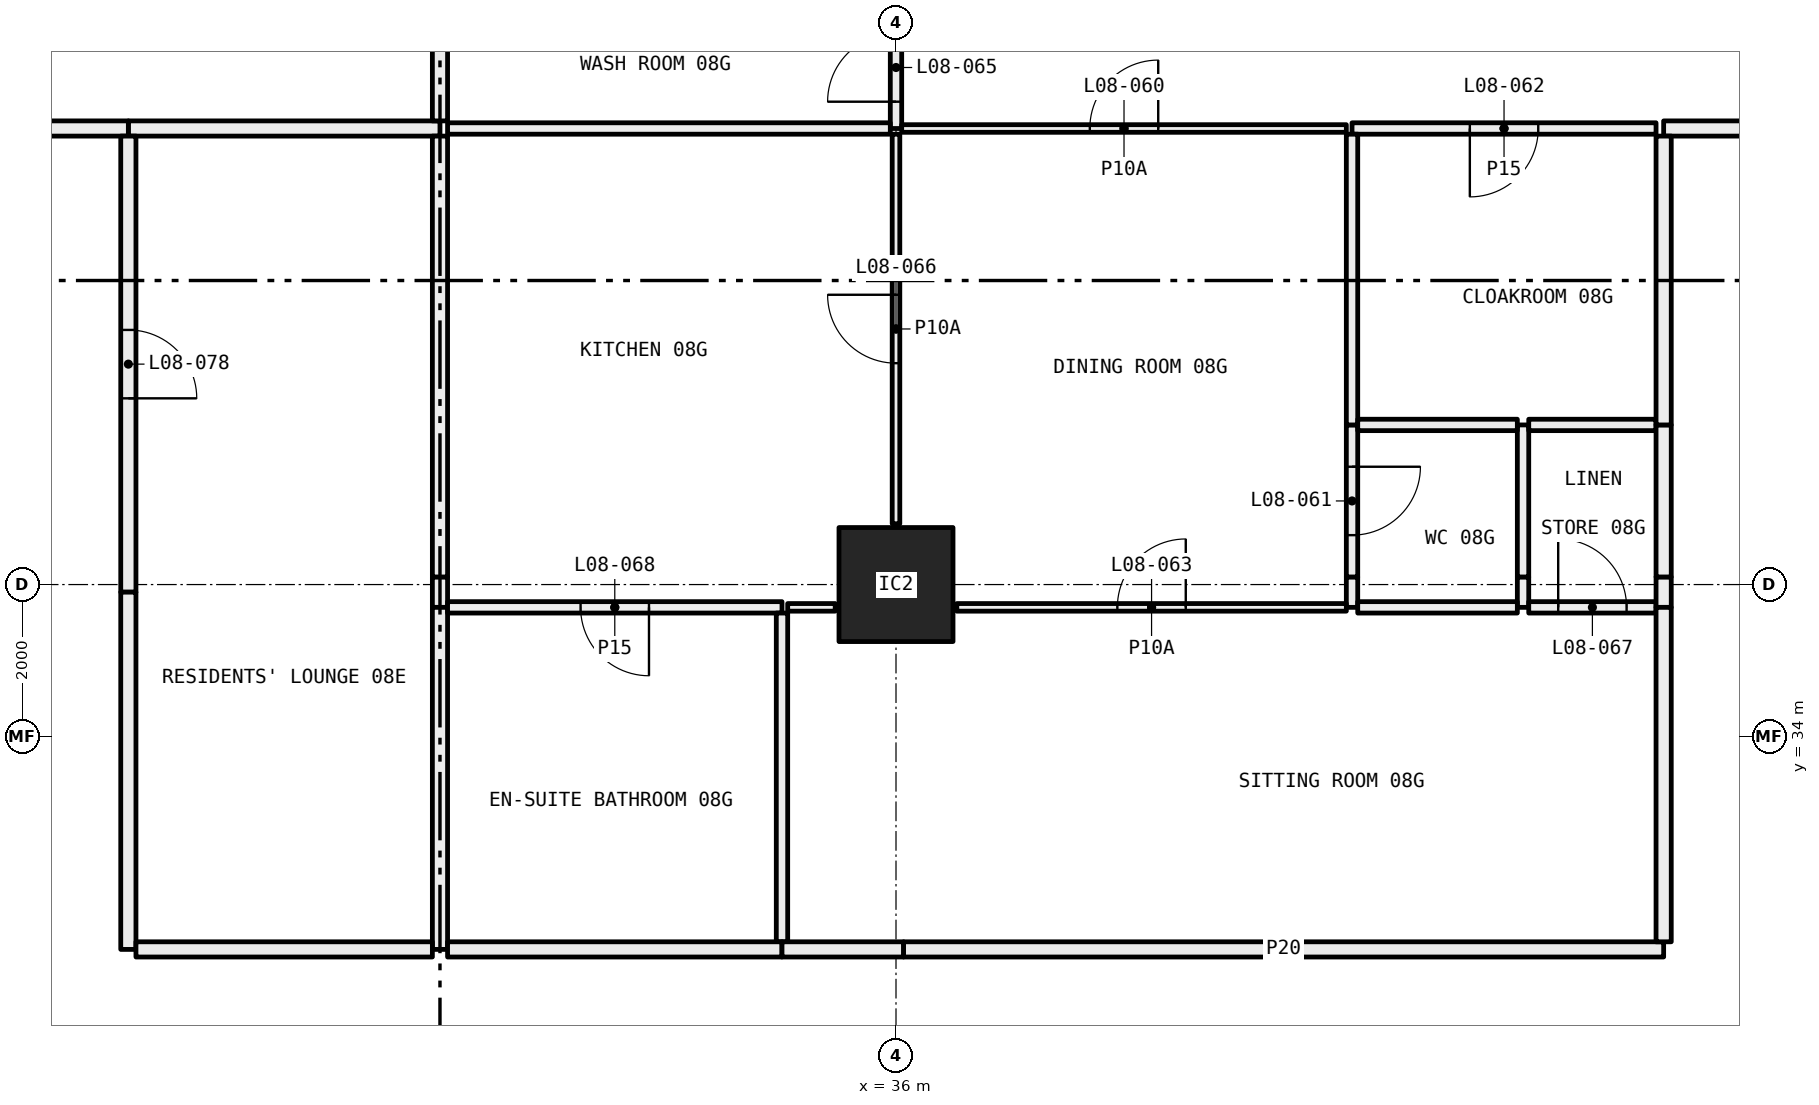
"""IFC4 building model, lengths in metres.
Left out: names, types, materials, properties, quantities, classifications, styles, units other than length and angle.
Written with IfcOpenShell. Run it as: python <this file> out.ifc"""

import sys

from ifc_helpers import new_model, si_unit, direction, frame, frame_2d, origin, origin_2d, place, context, subcontext, project, spatial, rectangle, hollow_rectangle, extrude, element, fill, save


model = new_model("IFC4")
c1 = context("Model", 3, precision=1e-05, world=origin(), true_north=direction((0.0, 1.0)))
c2 = subcontext(c1, "Body", "Model", "MODEL_VIEW")
j1 = project(units=[si_unit("LENGTHUNIT", "METRE"), si_unit("PLANEANGLEUNIT", "RADIAN")], contexts=[c1])
p1 = place(None, origin())
s1 = spatial("IfcSite", under=j1, at=p1, CompositionType="ELEMENT")
p2 = place(p1, origin())
s2 = spatial("IfcBuilding", under=s1, at=p2, CompositionType="ELEMENT")
p3 = place(p2, frame((0.0, 0.0, 40.35)))
s3 = spatial("IfcBuildingStorey", under=s2, at=p3, CompositionType="ELEMENT", Elevation=40.35)
p4 = place(p3, frame((36.0, 36.0, 0.0), z_axis=(0.0, 0.0, 1.0), x_axis=(1.0, 0.0, 0.0)))
e1 = element("IfcColumn", 1, at=p4, inside=s3, PredefinedType="COLUMN", context=c2, shape_type="SweptSolid", body=[
    extrude(hollow_rectangle(XDim=1.5, YDim=1.5, WallThickness=0.065, at=origin_2d()), origin(), (0.0, 0.0, 1.0), 3.05),
])
p5 = place(p3, frame((25.9, 42.0, 0.0), z_axis=(0.0, 0.0, 1.0), x_axis=(1.0, 0.0, 0.0)))
e2 = element("IfcWall", 2, at=p5, inside=s3, PredefinedType="PARTITIONING", context=c2, shape_type="SweptSolid", body=[
    extrude(rectangle(XDim=4.1, YDim=0.2, at=frame_2d((2.05, 0.0))), origin(), (0.0, 0.0, 1.0), 3.05),
])
p6 = place(p3, frame((30.0, 42.1, 0.0), z_axis=(0.0, 0.0, 1.0), x_axis=(0.0, 1.0, 0.0)))
e3 = element("IfcWall", 3, at=p6, inside=s3, PredefinedType="PARTITIONING", context=c2, shape_type="SweptSolid", body=[
    extrude(rectangle(XDim=1.58, YDim=0.2, at=frame_2d((0.79, 0.0))), origin(), (0.0, 0.0, 1.0), 3.05),
])
p7 = place(p3, frame((24.0, 42.0, 0.0), z_axis=(0.0, 0.0, 1.0), x_axis=(1.0, 0.0, 0.0)))
e4 = element("IfcWall", 4, at=p7, inside=s3, PredefinedType="PARTITIONING", context=c2, shape_type="SweptSolid", body=[
    extrude(rectangle(XDim=1.9, YDim=0.2, at=frame_2d((0.95, 0.0))), origin(), (0.0, 0.0, 1.0), 3.05),
])
p8 = place(p3, frame((30.0, 35.7, 0.0), z_axis=(0.0, 0.0, 1.0), x_axis=(0.0, 1.0, 0.0)))
e5 = element("IfcWall", 5, at=p8, inside=s3, PredefinedType="PARTITIONING", context=c2, shape_type="SweptSolid", body=[
    extrude(rectangle(XDim=0.4, YDim=0.2, at=frame_2d((0.2, 0.0))), origin(), (0.0, 0.0, 1.0), 2.45),
])
p9 = place(p3, frame((30.0, 36.1, 0.0), z_axis=(0.0, 0.0, 1.0), x_axis=(0.0, 1.0, 0.0)))
e6 = element("IfcWall", 6, at=p9, inside=s3, PredefinedType="PARTITIONING", context=c2, shape_type="SweptSolid", body=[
    extrude(rectangle(XDim=5.8, YDim=0.2, at=frame_2d((2.9, 0.0))), origin(), (0.0, 0.0, 1.0), 3.05),
])
p10 = place(p3, frame((30.0, 31.2, 0.0), z_axis=(0.0, 0.0, 1.0), x_axis=(0.0, 1.0, 0.0)))
e7 = element("IfcWall", 7, at=p10, inside=s3, PredefinedType="PARTITIONING", context=c2, shape_type="SweptSolid", body=[
    extrude(rectangle(XDim=4.5, YDim=0.2, at=frame_2d((2.25, 0.0))), origin(), (0.0, 0.0, 1.0), 3.05),
])
p11 = place(p3, frame((25.9, 41.9, 0.0), z_axis=(0.0, 0.0, 1.0), x_axis=(0.0, -1.0, 0.0)))
e8 = element("IfcWall", 8, at=p11, inside=s3, PredefinedType="PARTITIONING", context=c2, shape_type="SweptSolid", body=[
    extrude(rectangle(XDim=6.0, YDim=0.2, at=frame_2d((3.0, 0.0))), origin(), (0.0, 0.0, 1.0), 2.45),
])
p12 = place(p11, frame((2.55, 0.0, 0.0)))
e9 = element("IfcOpeningElement", 9, at=p12, cuts=e8, PredefinedType="OPENING", context=c2, shape_type="SweptSolid", body=[
    extrude(rectangle(XDim=0.9, YDim=2.1, at=frame_2d((0.45, 1.05))), frame((0.0, 0.11, 0.0), z_axis=(0.0, -1.0, 0.0), x_axis=(1.0, 0.0, 0.0)), (0.0, 0.0, 1.0), 0.22),
])
p13 = place(p3, frame((25.9, 35.9, 0.0), z_axis=(0.0, 0.0, 1.0), x_axis=(0.0, -1.0, 0.0)))
e10 = element("IfcWall", 10, at=p13, inside=s3, PredefinedType="PARTITIONING", context=c2, shape_type="SweptSolid", body=[
    extrude(rectangle(XDim=4.7, YDim=0.2, at=frame_2d((2.35, 0.0))), origin(), (0.0, 0.0, 1.0), 3.05),
])
p14 = place(p3, frame((26.0, 31.2, 0.0), z_axis=(0.0, 0.0, 1.0), x_axis=(1.0, 0.0, 0.0)))
e11 = element("IfcWall", 11, at=p14, inside=s3, PredefinedType="PARTITIONING", context=c2, shape_type="SweptSolid", body=[
    extrude(rectangle(XDim=3.9, YDim=0.2, at=frame_2d((1.95, 0.0))), origin(), (0.0, 0.0, 1.0), 3.05),
])
p15 = place(p3, frame((36.0, 42.0, 0.0), z_axis=(0.0, 0.0, 1.0), x_axis=(0.0, 1.0, 0.0)))
e12 = element("IfcWall", 12, at=p15, inside=s3, PredefinedType="PARTITIONING", context=c2, shape_type="SweptSolid", body=[
    extrude(rectangle(XDim=1.605, YDim=0.15, at=frame_2d((0.802, 0.0))), origin(), (0.0, 0.0, 1.0), 2.45),
])
p16 = place(p15, frame((0.353, 0.0, 0.0)))
e13 = element("IfcOpeningElement", 13, at=p16, cuts=e12, PredefinedType="OPENING", context=c2, shape_type="SweptSolid", body=[
    extrude(rectangle(XDim=0.9, YDim=2.1, at=frame_2d((0.45, 1.05))), frame((0.0, 0.085, 0.0), z_axis=(0.0, -1.0, 0.0), x_axis=(1.0, 0.0, 0.0)), (0.0, 0.0, 1.0), 0.17),
])
p17 = place(p3, frame((30.1, 42.0, 0.0), z_axis=(0.0, 0.0, 1.0), x_axis=(1.0, 0.0, 0.0)))
e14 = element("IfcWall", 14, at=p17, inside=s3, PredefinedType="PARTITIONING", context=c2, shape_type="SweptSolid", body=[
    extrude(rectangle(XDim=5.825, YDim=0.15, at=frame_2d((2.913, 0.0))), origin(), (0.0, 0.0, 1.0), 2.45),
])
p18 = place(p3, frame((36.075, 42.0, 0.0), z_axis=(0.0, 0.0, 1.0), x_axis=(1.0, 0.0, 0.0)))
e15 = element("IfcWall", 15, at=p18, inside=s3, PredefinedType="PARTITIONING", context=c2, shape_type="SweptSolid", body=[
    extrude(rectangle(XDim=5.85, YDim=0.1, at=frame_2d((2.925, 0.0))), origin(), (0.0, 0.0, 1.0), 2.45),
])
p19 = place(p18, frame((2.475, 0.0, 0.0)))
e16 = element("IfcOpeningElement", 16, at=p19, cuts=e15, PredefinedType="OPENING", context=c2, shape_type="SweptSolid", body=[
    extrude(rectangle(XDim=0.9, YDim=2.1, at=frame_2d((0.45, 1.05))), frame((0.0, 0.06, 0.0), z_axis=(0.0, -1.0, 0.0), x_axis=(1.0, 0.0, 0.0)), (0.0, 0.0, 1.0), 0.12),
])
p20 = place(p3, frame((42.0, 42.0, 0.0), z_axis=(0.0, 0.0, 1.0), x_axis=(1.0, 0.0, 0.0)))
e17 = element("IfcWall", 17, at=p20, inside=s3, PredefinedType="PARTITIONING", context=c2, shape_type="SweptSolid", body=[
    extrude(rectangle(XDim=4.0, YDim=0.15, at=frame_2d((2.0, 0.0))), origin(), (0.0, 0.0, 1.0), 3.05),
])
p21 = place(p20, frame((1.55, 0.0, 0.0)))
e18 = element("IfcOpeningElement", 18, at=p21, cuts=e17, PredefinedType="OPENING", context=c2, shape_type="SweptSolid", body=[
    extrude(rectangle(XDim=0.9, YDim=2.1, at=frame_2d((0.45, 1.05))), frame((0.0, 0.085, 0.0), z_axis=(0.0, -1.0, 0.0), x_axis=(1.0, 0.0, 0.0)), (0.0, 0.0, 1.0), 0.17),
])
p22 = place(p3, frame((46.1, 42.0, 0.0), z_axis=(0.0, 0.0, 1.0), x_axis=(1.0, 0.0, 0.0)))
e19 = element("IfcWall", 19, at=p22, inside=s3, PredefinedType="PARTITIONING", context=c2, shape_type="SweptSolid", body=[
    extrude(rectangle(XDim=1.9, YDim=0.2, at=frame_2d((0.95, 0.0))), origin(), (0.0, 0.0, 1.0), 3.05),
])
p23 = place(p3, frame((36.0, 36.8, 0.0), z_axis=(0.0, 0.0, 1.0), x_axis=(0.0, 1.0, 0.0)))
e20 = element("IfcWall", 20, at=p23, inside=s3, PredefinedType="PARTITIONING", context=c2, shape_type="SweptSolid", body=[
    extrude(rectangle(XDim=5.125, YDim=0.1, at=frame_2d((2.562, 0.0))), origin(), (0.0, 0.0, 1.0), 2.45),
])
p24 = place(p23, frame((2.113, 0.0, 0.0)))
e21 = element("IfcOpeningElement", 21, at=p24, cuts=e20, PredefinedType="OPENING", context=c2, shape_type="SweptSolid", body=[
    extrude(rectangle(XDim=0.9, YDim=2.1, at=frame_2d((0.45, 1.05))), frame((0.0, 0.06, 0.0), z_axis=(0.0, -1.0, 0.0), x_axis=(1.0, 0.0, 0.0)), (0.0, 0.0, 1.0), 0.12),
])
p25 = place(p3, frame((30.1, 35.7, 0.0), z_axis=(0.0, 0.0, 1.0), x_axis=(1.0, 0.0, 0.0)))
e22 = element("IfcWall", 22, at=p25, inside=s3, PredefinedType="PARTITIONING", context=c2, shape_type="SweptSolid", body=[
    extrude(rectangle(XDim=4.4, YDim=0.15, at=frame_2d((2.2, 0.0))), origin(), (0.0, 0.0, 1.0), 3.05),
])
p26 = place(p25, frame((1.75, 0.0, 0.0)))
e23 = element("IfcOpeningElement", 23, at=p26, cuts=e22, PredefinedType="OPENING", context=c2, shape_type="SweptSolid", body=[
    extrude(rectangle(XDim=0.9, YDim=2.1, at=frame_2d((0.45, 1.05))), frame((0.0, 0.085, 0.0), z_axis=(0.0, -1.0, 0.0), x_axis=(1.0, 0.0, 0.0)), (0.0, 0.0, 1.0), 0.17),
])
p27 = place(p3, frame((34.575, 35.7, 0.0), z_axis=(0.0, 0.0, 1.0), x_axis=(1.0, 0.0, 0.0)))
e24 = element("IfcWall", 24, at=p27, inside=s3, PredefinedType="PARTITIONING", context=c2, shape_type="SweptSolid", body=[
    extrude(rectangle(XDim=0.625, YDim=0.1, at=frame_2d((0.312, 0.0))), origin(), (0.0, 0.0, 1.0), 3.05),
])
p28 = place(p3, frame((42.0, 35.7, 0.0), z_axis=(0.0, 0.0, 1.0), x_axis=(0.0, 1.0, 0.0)))
e25 = element("IfcWall", 25, at=p28, inside=s3, PredefinedType="PARTITIONING", context=c2, shape_type="SweptSolid", body=[
    extrude(rectangle(XDim=0.4, YDim=0.15, at=frame_2d((0.2, 0.0))), origin(), (0.0, 0.0, 1.0), 2.45),
])
p29 = place(p3, frame((42.0, 36.1, 0.0), z_axis=(0.0, 0.0, 1.0), x_axis=(0.0, 1.0, 0.0)))
e26 = element("IfcWall", 26, at=p29, inside=s3, PredefinedType="PARTITIONING", context=c2, shape_type="SweptSolid", body=[
    extrude(rectangle(XDim=2.0, YDim=0.15, at=frame_2d((1.0, 0.0))), origin(), (0.0, 0.0, 1.0), 3.05),
])
p30 = place(p29, frame((0.55, 0.0, 0.0)))
e27 = element("IfcOpeningElement", 27, at=p30, cuts=e26, PredefinedType="OPENING", context=c2, shape_type="SweptSolid", body=[
    extrude(rectangle(XDim=0.9, YDim=2.1, at=frame_2d((0.45, 1.05))), frame((0.0, 0.085, 0.0), z_axis=(0.0, -1.0, 0.0), x_axis=(1.0, 0.0, 0.0)), (0.0, 0.0, 1.0), 0.17),
])
p31 = place(p3, frame((42.0, 38.1, 0.0), z_axis=(0.0, 0.0, 1.0), x_axis=(0.0, 1.0, 0.0)))
e28 = element("IfcWall", 28, at=p31, inside=s3, PredefinedType="PARTITIONING", context=c2, shape_type="SweptSolid", body=[
    extrude(rectangle(XDim=3.825, YDim=0.15, at=frame_2d((1.913, 0.0))), origin(), (0.0, 0.0, 1.0), 3.05),
])
p32 = place(p3, frame((36.8, 35.7, 0.0), z_axis=(0.0, 0.0, 1.0), x_axis=(1.0, 0.0, 0.0)))
e29 = element("IfcWall", 29, at=p32, inside=s3, PredefinedType="PARTITIONING", context=c2, shape_type="SweptSolid", body=[
    extrude(rectangle(XDim=5.125, YDim=0.1, at=frame_2d((2.562, 0.0))), origin(), (0.0, 0.0, 1.0), 3.05),
])
p33 = place(p32, frame((2.113, 0.0, 0.0)))
e30 = element("IfcOpeningElement", 30, at=p33, cuts=e29, PredefinedType="OPENING", context=c2, shape_type="SweptSolid", body=[
    extrude(rectangle(XDim=0.9, YDim=2.1, at=frame_2d((0.45, 1.05))), frame((0.0, 0.06, 0.0), z_axis=(0.0, -1.0, 0.0), x_axis=(1.0, 0.0, 0.0)), (0.0, 0.0, 1.0), 0.12),
])
p34 = place(p3, frame((44.25, 35.7, 0.0), z_axis=(0.0, 0.0, 1.0), x_axis=(0.0, 1.0, 0.0)))
e31 = element("IfcWall", 31, at=p34, inside=s3, PredefinedType="PARTITIONING", context=c2, shape_type="SweptSolid", body=[
    extrude(rectangle(XDim=0.4, YDim=0.15, at=frame_2d((0.2, 0.0))), origin(), (0.0, 0.0, 1.0), 2.45),
])
p35 = place(p3, frame((44.25, 36.1, 0.0), z_axis=(0.0, 0.0, 1.0), x_axis=(0.0, 1.0, 0.0)))
e32 = element("IfcWall", 32, at=p35, inside=s3, PredefinedType="PARTITIONING", context=c2, shape_type="SweptSolid", body=[
    extrude(rectangle(XDim=2.0, YDim=0.15, at=frame_2d((1.0, 0.0))), origin(), (0.0, 0.0, 1.0), 3.05),
])
for number, where, z_axis, x_axis in (
    (33, (44.175, 38.1, 0.0), (0.0, 0.0, 1.0), (-1.0, 0.0, 0.0)),
    (34, (42.075, 35.7, 0.0), (0.0, 0.0, 1.0), (1.0, 0.0, 0.0)),
):
    element("IfcWall", number, at=place(p3, frame(where, z_axis=z_axis, x_axis=x_axis)), inside=s3, PredefinedType="PARTITIONING", context=c2, shape_type="SweptSolid", body=[
        extrude(rectangle(XDim=2.1, YDim=0.15, at=frame_2d((1.05, 0.0))), origin(), (0.0, 0.0, 1.0), 3.05),
    ])
p36 = place(p3, frame((46.0, 38.1, 0.0), z_axis=(0.0, 0.0, 1.0), x_axis=(-1.0, 0.0, 0.0)))
e35 = element("IfcWall", 35, at=p36, inside=s3, PredefinedType="PARTITIONING", context=c2, shape_type="SweptSolid", body=[
    extrude(rectangle(XDim=1.675, YDim=0.15, at=frame_2d((0.837, 0.0))), origin(), (0.0, 0.0, 1.0), 3.05),
])
p37 = place(p3, frame((44.325, 35.7, 0.0), z_axis=(0.0, 0.0, 1.0), x_axis=(1.0, 0.0, 0.0)))
e36 = element("IfcWall", 36, at=p37, inside=s3, PredefinedType="PARTITIONING", context=c2, shape_type="SweptSolid", body=[
    extrude(rectangle(XDim=1.675, YDim=0.15, at=frame_2d((0.837, 0.0))), origin(), (0.0, 0.0, 1.0), 3.05),
])
p38 = place(p37, frame((0.387, 0.0, 0.0)))
e37 = element("IfcOpeningElement", 37, at=p38, cuts=e36, PredefinedType="OPENING", context=c2, shape_type="SweptSolid", body=[
    extrude(rectangle(XDim=0.9, YDim=2.1, at=frame_2d((0.45, 1.05))), frame((0.0, 0.085, 0.0), z_axis=(0.0, -1.0, 0.0), x_axis=(1.0, 0.0, 0.0)), (0.0, 0.0, 1.0), 0.17),
])
p39 = place(p3, frame((46.1, 35.7, 0.0), z_axis=(0.0, 0.0, 1.0), x_axis=(0.0, 1.0, 0.0)))
e38 = element("IfcWall", 38, at=p39, inside=s3, PredefinedType="PARTITIONING", context=c2, shape_type="SweptSolid", body=[
    extrude(rectangle(XDim=0.4, YDim=0.2, at=frame_2d((0.2, 0.0))), origin(), (0.0, 0.0, 1.0), 2.45),
])
p40 = place(p3, frame((46.1, 36.1, 0.0), z_axis=(0.0, 0.0, 1.0), x_axis=(0.0, 1.0, 0.0)))
e39 = element("IfcWall", 39, at=p40, inside=s3, PredefinedType="PARTITIONING", context=c2, shape_type="SweptSolid", body=[
    extrude(rectangle(XDim=2.0, YDim=0.2, at=frame_2d((1.0, 0.0))), origin(), (0.0, 0.0, 1.0), 3.05),
])
p41 = place(p3, frame((46.1, 38.1, 0.0), z_axis=(0.0, 0.0, 1.0), x_axis=(0.0, 1.0, 0.0)))
e40 = element("IfcWall", 40, at=p41, inside=s3, PredefinedType="PARTITIONING", context=c2, shape_type="SweptSolid", body=[
    extrude(rectangle(XDim=3.8, YDim=0.2, at=frame_2d((1.9, 0.0))), origin(), (0.0, 0.0, 1.0), 3.05),
])
p42 = place(p3, frame((34.5, 31.3, 0.0), z_axis=(0.0, 0.0, 1.0), x_axis=(0.0, 1.0, 0.0)))
e41 = element("IfcWall", 41, at=p42, inside=s3, PredefinedType="PARTITIONING", context=c2, shape_type="SweptSolid", body=[
    extrude(rectangle(XDim=4.325, YDim=0.15, at=frame_2d((2.163, 0.0))), origin(), (0.0, 0.0, 1.0), 3.05),
])
p43 = place(p3, frame((30.1, 31.2, 0.0), z_axis=(0.0, 0.0, 1.0), x_axis=(1.0, 0.0, 0.0)))
e42 = element("IfcWall", 42, at=p43, inside=s3, PredefinedType="PARTITIONING", context=c2, shape_type="SweptSolid", body=[
    extrude(rectangle(XDim=4.4, YDim=0.2, at=frame_2d((2.2, 0.0))), origin(), (0.0, 0.0, 1.0), 3.05),
])
p44 = place(p3, frame((34.5, 31.2, 0.0), z_axis=(0.0, 0.0, 1.0), x_axis=(1.0, 0.0, 0.0)))
e43 = element("IfcWall", 43, at=p44, inside=s3, PredefinedType="PARTITIONING", context=c2, shape_type="SweptSolid", body=[
    extrude(rectangle(XDim=1.6, YDim=0.2, at=frame_2d((0.8, 0.0))), origin(), (0.0, 0.0, 1.0), 2.45),
])
p45 = place(p3, frame((36.1, 31.2, 0.0), z_axis=(0.0, 0.0, 1.0), x_axis=(1.0, 0.0, 0.0)))
e44 = element("IfcWall", 44, at=p45, inside=s3, PredefinedType="PARTITIONING", context=c2, shape_type="SweptSolid", body=[
    extrude(rectangle(XDim=10.0, YDim=0.2, at=frame_2d((5.0, 0.0))), origin(), (0.0, 0.0, 1.0), 3.05),
])
p46 = place(p3, frame((46.1, 31.3, 0.0), z_axis=(0.0, 0.0, 1.0), x_axis=(0.0, 1.0, 0.0)))
e45 = element("IfcWall", 45, at=p46, inside=s3, PredefinedType="PARTITIONING", context=c2, shape_type="SweptSolid", body=[
    extrude(rectangle(XDim=4.4, YDim=0.2, at=frame_2d((2.2, 0.0))), origin(), (0.0, 0.0, 1.0), 3.05),
])
p47 = place(p19, origin())
e46 = element("IfcDoor", 46, at=p47, inside=s3, OperationType="SINGLE_SWING_LEFT", PredefinedType="DOOR", context=c2, shape_type="SweptSolid", body=[
    extrude(rectangle(XDim=0.9, YDim=2.1, at=frame_2d((0.45, 1.05))), frame((0.0, 0.025, 0.0), z_axis=(0.0, -1.0, 0.0), x_axis=(1.0, 0.0, 0.0)), (0.0, 0.0, 1.0), 0.05),
])
fill(e16, e46)
p48 = place(p30, frame((0.9, 0.0, 0.0), x_axis=(-1.0, 0.0, 0.0)))
e47 = element("IfcDoor", 47, at=p48, inside=s3, OperationType="SINGLE_SWING_RIGHT", PredefinedType="DOOR", context=c2, shape_type="SweptSolid", body=[
    extrude(rectangle(XDim=0.9, YDim=2.1, at=frame_2d((0.45, 1.05))), frame((0.0, 0.025, 0.0), z_axis=(0.0, -1.0, 0.0), x_axis=(1.0, 0.0, 0.0)), (0.0, 0.0, 1.0), 0.05),
])
fill(e27, e47)
p49 = place(p21, frame((0.9, 0.0, 0.0), x_axis=(-1.0, 0.0, 0.0)))
e48 = element("IfcDoor", 48, at=p49, inside=s3, OperationType="SINGLE_SWING_LEFT", PredefinedType="DOOR", context=c2, shape_type="SweptSolid", body=[
    extrude(rectangle(XDim=0.9, YDim=2.1, at=frame_2d((0.45, 1.05))), frame((0.0, 0.025, 0.0), z_axis=(0.0, -1.0, 0.0), x_axis=(1.0, 0.0, 0.0)), (0.0, 0.0, 1.0), 0.05),
])
fill(e18, e48)
p50 = place(p33, origin())
e49 = element("IfcDoor", 49, at=p50, inside=s3, OperationType="SINGLE_SWING_LEFT", PredefinedType="DOOR", context=c2, shape_type="SweptSolid", body=[
    extrude(rectangle(XDim=0.9, YDim=2.1, at=frame_2d((0.45, 1.05))), frame((0.0, 0.025, 0.0), z_axis=(0.0, -1.0, 0.0), x_axis=(1.0, 0.0, 0.0)), (0.0, 0.0, 1.0), 0.05),
])
fill(e30, e49)
p51 = place(p16, origin())
e50 = element("IfcDoor", 50, at=p51, inside=s3, OperationType="SINGLE_SWING_RIGHT", PredefinedType="DOOR", context=c2, shape_type="SweptSolid", body=[
    extrude(rectangle(XDim=0.9, YDim=2.1, at=frame_2d((0.45, 1.05))), frame((0.0, 0.025, 0.0), z_axis=(0.0, -1.0, 0.0), x_axis=(1.0, 0.0, 0.0)), (0.0, 0.0, 1.0), 0.05),
])
fill(e13, e50)
p52 = place(p24, origin())
e51 = element("IfcDoor", 51, at=p52, inside=s3, OperationType="SINGLE_SWING_LEFT", PredefinedType="DOOR", context=c2, shape_type="SweptSolid", body=[
    extrude(rectangle(XDim=0.9, YDim=2.1, at=frame_2d((0.45, 1.05))), frame((0.0, 0.025, 0.0), z_axis=(0.0, -1.0, 0.0), x_axis=(1.0, 0.0, 0.0)), (0.0, 0.0, 1.0), 0.05),
])
fill(e21, e51)
p53 = place(p38, origin())
e52 = element("IfcDoor", 52, at=p53, inside=s3, OperationType="SINGLE_SWING_RIGHT", PredefinedType="DOOR", context=c2, shape_type="SweptSolid", body=[
    extrude(rectangle(XDim=0.9, YDim=2.1, at=frame_2d((0.45, 1.05))), frame((0.0, 0.025, 0.0), z_axis=(0.0, -1.0, 0.0), x_axis=(1.0, 0.0, 0.0)), (0.0, 0.0, 1.0), 0.05),
])
fill(e37, e52)
p54 = place(p26, frame((0.9, 0.0, 0.0), x_axis=(-1.0, 0.0, 0.0)))
e53 = element("IfcDoor", 53, at=p54, inside=s3, OperationType="SINGLE_SWING_RIGHT", PredefinedType="DOOR", context=c2, shape_type="SweptSolid", body=[
    extrude(rectangle(XDim=0.9, YDim=2.1, at=frame_2d((0.45, 1.05))), frame((0.0, 0.025, 0.0), z_axis=(0.0, -1.0, 0.0), x_axis=(1.0, 0.0, 0.0)), (0.0, 0.0, 1.0), 0.05),
])
fill(e23, e53)
p55 = place(p12, origin())
e54 = element("IfcDoor", 54, at=p55, inside=s3, OperationType="SINGLE_SWING_LEFT", PredefinedType="DOOR", context=c2, shape_type="SweptSolid", body=[
    extrude(rectangle(XDim=0.9, YDim=2.1, at=frame_2d((0.45, 1.05))), frame((0.0, 0.025, 0.0), z_axis=(0.0, -1.0, 0.0), x_axis=(1.0, 0.0, 0.0)), (0.0, 0.0, 1.0), 0.05),
])
fill(e9, e54)
save(model, sys.argv[1])
